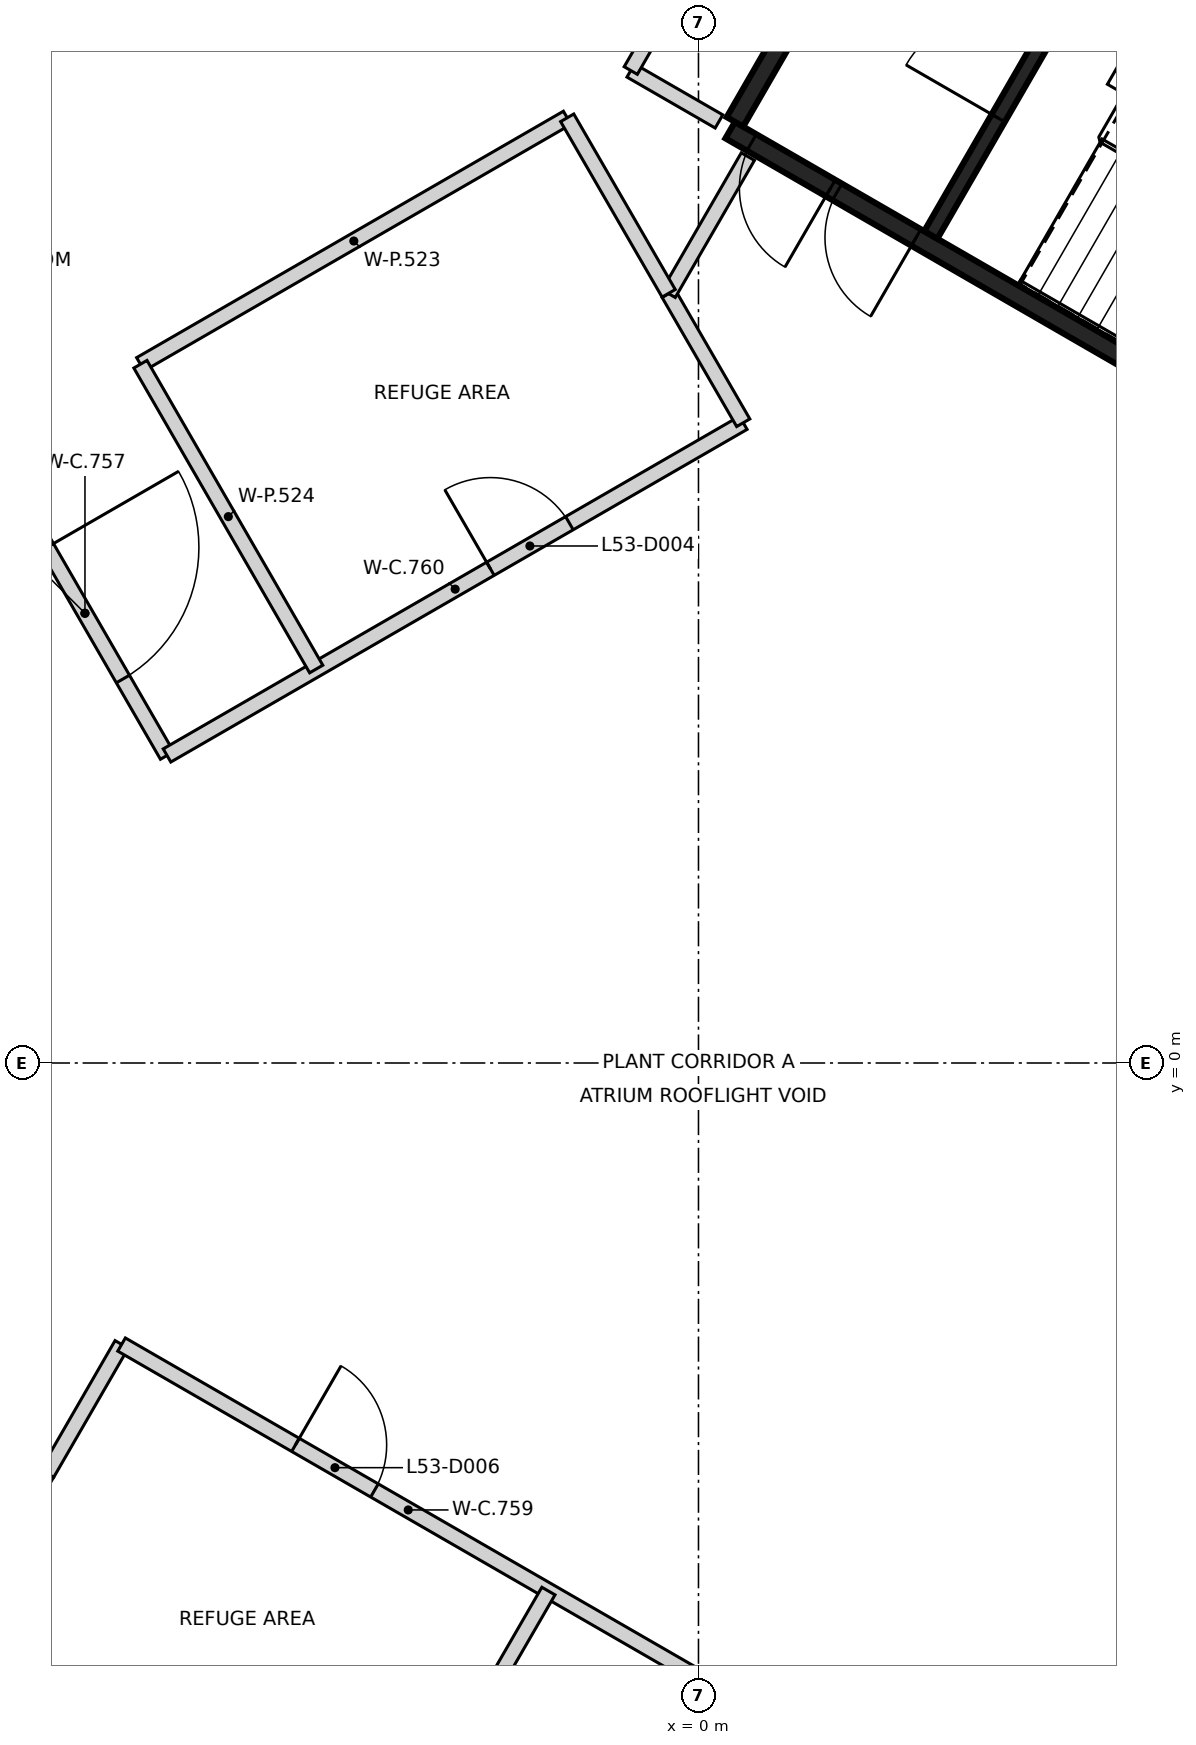
"""IFC4 building model, lengths in metres.
Left out: names, types, materials, properties, quantities, classifications, styles, units other than length and angle.
Written with IfcOpenShell. Run it as: python <this file> out.ifc"""

import sys

from ifc_helpers import new_model, si_unit, direction, frame, frame_2d, origin, origin_2d, place, context, subcontext, project, spatial, rectangle, extrude, element, fill, save


model = new_model("IFC4")
c1 = context("Model", 3, precision=1e-05, world=origin(), true_north=direction((0.0, 1.0)))
c2 = subcontext(c1, "Body", "Model", "MODEL_VIEW")
j1 = project(units=[si_unit("LENGTHUNIT", "METRE"), si_unit("PLANEANGLEUNIT", "RADIAN")], contexts=[c1])
p1 = place(None, origin())
s1 = spatial("IfcSite", under=j1, at=p1, CompositionType="ELEMENT")
p2 = place(p1, origin())
s2 = spatial("IfcBuilding", under=s1, at=p2, CompositionType="ELEMENT")
p3 = place(p2, frame((0.0, 0.0, 211.6)))
s3 = spatial("IfcBuildingStorey", under=s2, at=p3, CompositionType="ELEMENT", Elevation=211.6)
p4 = place(p3, frame((10.42, 6.498, 0.0), z_axis=(0.0, 0.0, 1.0), x_axis=(-0.866021906294, 0.500006057782, 0.0)))
e1 = element("IfcWall", 1, at=p4, inside=s3, PredefinedType="SHEAR", context=c2, shape_type="SweptSolid", body=[
    extrude(rectangle(XDim=11.55, YDim=0.25, at=frame_2d((5.775, 0.0))), origin(), (0.0, 0.0, 1.0), 4.45),
])
p5 = place(p4, frame((10.025, 0.0, 0.0)))
e2 = element("IfcOpeningElement", 2, at=p5, cuts=e1, PredefinedType="OPENING", context=c2, shape_type="SweptSolid", body=[
    extrude(rectangle(XDim=1.2, YDim=2.1, at=frame_2d((0.6, 1.05))), frame((0.0, 0.135, 0.0), z_axis=(0.0, -1.0, 0.0), x_axis=(1.0, 0.0, 0.0)), (0.0, 0.0, 1.0), 0.27),
])
p6 = place(p4, frame((8.725, 0.0, 0.0)))
e3 = element("IfcOpeningElement", 3, at=p6, cuts=e1, PredefinedType="OPENING", context=c2, shape_type="SweptSolid", body=[
    extrude(rectangle(XDim=1.2, YDim=2.1, at=frame_2d((0.6, 1.05))), frame((0.0, 0.135, 0.0), z_axis=(0.0, -1.0, 0.0), x_axis=(1.0, 0.0, 0.0)), (0.0, 0.0, 1.0), 0.27),
])
p7 = place(p3, frame((0.48, 12.381, 0.0), z_axis=(0.0, 0.0, 1.0), x_axis=(0.49999885962, 0.866026062182, 0.0)))
e4 = element("IfcWall", 4, at=p7, inside=s3, PredefinedType="SHEAR", context=c2, shape_type="SweptSolid", body=[
    extrude(rectangle(XDim=5.225, YDim=0.25, at=frame_2d((2.612, 0.0))), origin(), (0.0, 0.0, 1.0), 4.45),
])
p8 = place(p7, frame((1.95, 0.0, 0.0)))
e5 = element("IfcOpeningElement", 5, at=p8, cuts=e4, PredefinedType="OPENING", context=c2, shape_type="SweptSolid", body=[
    extrude(rectangle(XDim=1.2, YDim=2.1, at=frame_2d((0.6, 1.05))), frame((0.0, 0.135, 0.0), z_axis=(0.0, -1.0, 0.0), x_axis=(1.0, 0.0, 0.0)), (0.0, 0.0, 1.0), 0.27),
])
p9 = place(p3, frame((3.057, 10.895, 0.0), z_axis=(0.0, 0.0, 1.0), x_axis=(0.500027839223, 0.866009330205, 0.0)))
e6 = element("IfcWall", 6, at=p9, inside=s3, PredefinedType="SHEAR", context=c2, shape_type="SweptSolid", body=[
    extrude(rectangle(XDim=5.098, YDim=0.2, at=frame_2d((2.549, 0.0))), origin(), (0.0, 0.0, 1.0), 4.45),
])
p10 = place(p9, frame((1.774, 0.0, 0.0)))
e7 = element("IfcOpeningElement", 7, at=p10, cuts=e6, PredefinedType="OPENING", context=c2, shape_type="SweptSolid", body=[
    extrude(rectangle(XDim=1.4, YDim=2.1, at=frame_2d((0.7, 1.05))), frame((0.0, 0.11, 0.0), z_axis=(0.0, -1.0, 0.0), x_axis=(1.0, 0.0, 0.0)), (0.0, 0.0, 1.0), 0.22),
])
p11 = place(p3, frame((0.417, -12.273, 0.0), z_axis=(0.0, 0.0, 1.0), x_axis=(0.866021906294, 0.500006057782, 0.0)))
e8 = element("IfcWall", 8, at=p11, inside=s3, PredefinedType="SHEAR", context=c2, shape_type="SweptSolid", body=[
    extrude(rectangle(XDim=11.55, YDim=0.25, at=frame_2d((5.775, 0.0))), origin(), (0.0, 0.0, 1.0), 4.45),
])
p12 = place(p11, frame((10.025, 0.0, 0.0)))
e9 = element("IfcOpeningElement", 9, at=p12, cuts=e8, PredefinedType="OPENING", context=c2, shape_type="SweptSolid", body=[
    extrude(rectangle(XDim=1.2, YDim=2.1, at=frame_2d((0.6, 1.05))), frame((0.0, 0.135, 0.0), z_axis=(0.0, -1.0, 0.0), x_axis=(1.0, 0.0, 0.0)), (0.0, 0.0, 1.0), 0.27),
])
p13 = place(p11, frame((8.725, 0.0, 0.0)))
e10 = element("IfcOpeningElement", 10, at=p13, cuts=e8, PredefinedType="OPENING", context=c2, shape_type="SweptSolid", body=[
    extrude(rectangle(XDim=1.2, YDim=2.1, at=frame_2d((0.6, 1.05))), frame((0.0, 0.135, 0.0), z_axis=(0.0, -1.0, 0.0), x_axis=(1.0, 0.0, 0.0)), (0.0, 0.0, 1.0), 0.27),
])
p14 = place(p3, frame((-9.151, 7.786, 0.0), z_axis=(0.0, 0.0, 1.0), x_axis=(0.499939416935, -0.866060378608, 0.0)))
e11 = element("IfcWall", 11, at=p14, inside=s3, PredefinedType="PARTITIONING", context=c2, shape_type="SweptSolid", body=[
    extrude(rectangle(XDim=4.318, YDim=0.2, at=frame_2d((2.159, 0.0))), origin(), (0.0, 0.0, 1.0), 4.45),
])
p15 = place(p14, frame((1.157, 0.0, 0.0)))
e12 = element("IfcOpeningElement", 12, at=p15, cuts=e11, PredefinedType="OPENING", context=c2, shape_type="SweptSolid", body=[
    extrude(rectangle(XDim=2.0, YDim=2.1, at=frame_2d((1.0, 1.05))), frame((0.0, 0.11, 0.0), z_axis=(0.0, -1.0, 0.0), x_axis=(1.0, 0.0, 0.0)), (0.0, 0.0, 1.0), 0.22),
])
p16 = place(p3, frame((-8.569, -5.4, 0.0), z_axis=(0.0, 0.0, 1.0), x_axis=(0.499862594797, 0.866104720183, 0.0)))
e13 = element("IfcWall", 13, at=p16, inside=s3, PredefinedType="PARTITIONING", context=c2, shape_type="SweptSolid", body=[
    extrude(rectangle(XDim=1.96, YDim=0.2, at=frame_2d((0.98, 0.0))), origin(), (0.0, 0.0, 1.0), 4.45),
])
p17 = place(p3, frame((-7.59, -3.704, 0.0), z_axis=(0.0, 0.0, 1.0), x_axis=(0.866168783239, -0.499751577228, 0.0)))
e14 = element("IfcWall", 14, at=p17, inside=s3, PredefinedType="PARTITIONING", context=c2, shape_type="SweptSolid", body=[
    extrude(rectangle(XDim=8.708, YDim=0.2, at=frame_2d((4.354, 0.0))), origin(), (0.0, 0.0, 1.0), 4.45),
])
p18 = place(p17, frame((2.641, 0.0, 0.0)))
e15 = element("IfcOpeningElement", 15, at=p18, cuts=e14, PredefinedType="OPENING", context=c2, shape_type="SweptSolid", body=[
    extrude(rectangle(XDim=1.2, YDim=2.1, at=frame_2d((0.6, 1.05))), frame((0.0, 0.11, 0.0), z_axis=(0.0, -1.0, 0.0), x_axis=(1.0, 0.0, 0.0)), (0.0, 0.0, 1.0), 0.22),
])
p19 = place(p3, frame((-6.992, 4.046, 0.0), z_axis=(0.0, 0.0, 1.0), x_axis=(0.866074131153, 0.499915592224, 0.0)))
e16 = element("IfcWall", 16, at=p19, inside=s3, PredefinedType="PARTITIONING", context=c2, shape_type="SweptSolid", body=[
    extrude(rectangle(XDim=8.754, YDim=0.2, at=frame_2d((4.377, 0.0))), origin(), (0.0, 0.0, 1.0), 4.45),
])
p20 = place(p19, frame((4.913, 0.0, 0.0)))
e17 = element("IfcOpeningElement", 17, at=p20, cuts=e16, PredefinedType="OPENING", context=c2, shape_type="SweptSolid", body=[
    extrude(rectangle(XDim=1.2, YDim=2.1, at=frame_2d((0.6, 1.05))), frame((0.0, 0.11, 0.0), z_axis=(0.0, -1.0, 0.0), x_axis=(1.0, 0.0, 0.0)), (0.0, 0.0, 1.0), 0.22),
])
p21 = place(p3, frame((-0.891, 13.057, 0.0), z_axis=(0.0, 0.0, 1.0), x_axis=(0.866206814563, -0.499685655593, 0.0)))
e18 = element("IfcWall", 18, at=p21, inside=s3, PredefinedType="PARTITIONING", context=c2, shape_type="SweptSolid", body=[
    extrude(rectangle(XDim=1.34, YDim=0.2, at=frame_2d((0.67, 0.0))), origin(), (0.0, 0.0, 1.0), 4.45),
])
p22 = place(p3, frame((-0.891, 13.057, 0.0), z_axis=(0.0, 0.0, 1.0), x_axis=(0.499972238474, 0.866041431316, 0.0)))
e19 = element("IfcWall", 19, at=p22, inside=s3, PredefinedType="PARTITIONING", context=c2, shape_type="SweptSolid", body=[
    extrude(rectangle(XDim=7.953, YDim=0.2, at=frame_2d((3.977, 0.0))), origin(), (0.0, 0.0, 1.0), 4.45),
])
p23 = place(p3, frame((-0.392, 10.121, 0.0), z_axis=(0.0, 0.0, 1.0), x_axis=(0.500329449036, -0.865835112725, 0.0)))
e20 = element("IfcWall", 20, at=p23, inside=s3, PredefinedType="PARTITIONING", context=c2, shape_type="SweptSolid", body=[
    extrude(rectangle(XDim=1.961, YDim=0.2, at=frame_2d((0.98, 0.0))), origin(), (0.0, 0.0, 1.0), 4.45),
])
p24 = place(p3, frame((-0.392, 10.121, 0.0), z_axis=(0.0, 0.0, 1.0), x_axis=(0.50017216111, 0.865925983702, 0.0)))
e21 = element("IfcWall", 21, at=p24, inside=s3, PredefinedType="PARTITIONING", context=c2, shape_type="SweptSolid", body=[
    extrude(rectangle(XDim=2.083, YDim=0.2, at=frame_2d((1.042, 0.0))), origin(), (0.0, 0.0, 1.0), 4.45),
])
p25 = place(p3, frame((-9.905, -7.714, 0.0), z_axis=(0.0, 0.0, 1.0), x_axis=(0.499368495827, 0.866389696023, 0.0)))
e22 = element("IfcWall", 22, at=p25, inside=s3, PredefinedType="PARTITIONING", context=c2, shape_type="SweptSolid", body=[
    extrude(rectangle(XDim=2.667, YDim=0.2, at=frame_2d((1.334, 0.0))), origin(), (0.0, 0.0, 1.0), 4.45),
])
p26 = place(p3, frame((-9.905, -7.714, 0.0), z_axis=(0.0, 0.0, 1.0), x_axis=(0.866044474677, -0.49996696679, 0.0)))
e23 = element("IfcWall", 23, at=p26, inside=s3, PredefinedType="PARTITIONING", context=c2, shape_type="SweptSolid", body=[
    extrude(rectangle(XDim=6.482, YDim=0.2, at=frame_2d((3.241, 0.0))), origin(), (0.0, 0.0, 1.0), 4.45),
])
p27 = place(p3, frame((-7.342, 9.193, 0.0), z_axis=(0.0, 0.0, 1.0), x_axis=(0.866016906217, 0.500014717929, 0.0)))
e24 = element("IfcWall", 24, at=p27, inside=s3, PredefinedType="PARTITIONING", context=c2, shape_type="SweptSolid", body=[
    extrude(rectangle(XDim=6.484, YDim=0.2, at=frame_2d((3.242, 0.0))), origin(), (0.0, 0.0, 1.0), 4.45),
])
p28 = place(p3, frame((-7.342, 9.193, 0.0), z_axis=(0.0, 0.0, 1.0), x_axis=(0.499644836288, -0.866230360569, 0.0)))
e25 = element("IfcWall", 25, at=p28, inside=s3, PredefinedType="PARTITIONING", context=c2, shape_type="SweptSolid", body=[
    extrude(rectangle(XDim=4.629, YDim=0.2, at=frame_2d((2.314, 0.0))), origin(), (0.0, 0.0, 1.0), 4.45),
])
p29 = place(p3, frame((-4.291, -10.955, 0.0), z_axis=(0.0, 0.0, 1.0), x_axis=(0.500460335608, 0.86575946572, 0.0)))
e26 = element("IfcWall", 26, at=p29, inside=s3, PredefinedType="PARTITIONING", context=c2, shape_type="SweptSolid", body=[
    extrude(rectangle(XDim=4.63, YDim=0.2, at=frame_2d((2.315, 0.0))), origin(), (0.0, 0.0, 1.0), 4.45),
])
p30 = place(p3, frame((-1.727, 12.435, 0.0), z_axis=(0.0, 0.0, 1.0), x_axis=(0.500509380909, -0.865731112772, 0.0)))
e27 = element("IfcWall", 27, at=p30, inside=s3, PredefinedType="PARTITIONING", context=c2, shape_type="SweptSolid", body=[
    extrude(rectangle(XDim=2.667, YDim=0.2, at=frame_2d((1.333, 0.0))), origin(), (0.0, 0.0, 1.0), 4.45),
])
p31 = place(p3, frame((0.0, 0.0, -0.4)))
p32 = place(p31, origin())
p33 = place(p32, frame((0.0, 0.0, 0.35)))
e28 = element("IfcWindow", 28, at=p33, inside=s3, PartitioningType="SINGLE_PANEL", PredefinedType="SKYLIGHT", context=c2, shape_type="SweptSolid", body=[
    extrude(rectangle(XDim=7.95, YDim=4.96, at=origin_2d()), origin(), (0.0, 0.0, 1.0), 0.05),
])
p34 = place(p5, origin())
e29 = element("IfcDoor", 29, at=p34, inside=s3, OperationType="SINGLE_SWING_LEFT", PredefinedType="DOOR", context=c2, shape_type="SweptSolid", body=[
    extrude(rectangle(XDim=1.2, YDim=2.1, at=frame_2d((0.6, 1.05))), frame((0.0, 0.025, 0.0), z_axis=(0.0, -1.0, 0.0), x_axis=(1.0, 0.0, 0.0)), (0.0, 0.0, 1.0), 0.05),
])
fill(e2, e29)
p35 = place(p6, origin())
e30 = element("IfcDoor", 30, at=p35, inside=s3, OperationType="SINGLE_SWING_RIGHT", PredefinedType="DOOR", context=c2, shape_type="SweptSolid", body=[
    extrude(rectangle(XDim=1.2, YDim=2.1, at=frame_2d((0.6, 1.05))), frame((0.0, 0.025, 0.0), z_axis=(0.0, -1.0, 0.0), x_axis=(1.0, 0.0, 0.0)), (0.0, 0.0, 1.0), 0.05),
])
fill(e3, e30)
p36 = place(p10, origin())
e31 = element("IfcDoor", 31, at=p36, inside=s3, OperationType="SINGLE_SWING_LEFT", PredefinedType="DOOR", context=c2, shape_type="SweptSolid", body=[
    extrude(rectangle(XDim=1.4, YDim=2.1, at=frame_2d((0.7, 1.05))), frame((0.0, 0.025, 0.0), z_axis=(0.0, -1.0, 0.0), x_axis=(1.0, 0.0, 0.0)), (0.0, 0.0, 1.0), 0.05),
])
fill(e7, e31)
p37 = place(p15, origin())
e32 = element("IfcDoor", 32, at=p37, inside=s3, OperationType="DOUBLE_DOOR_SINGLE_SWING", PredefinedType="DOOR", context=c2, shape_type="SweptSolid", body=[
    extrude(rectangle(XDim=2.0, YDim=2.1, at=frame_2d((1.0, 1.05))), frame((0.0, 0.025, 0.0), z_axis=(0.0, -1.0, 0.0), x_axis=(1.0, 0.0, 0.0)), (0.0, 0.0, 1.0), 0.05),
])
fill(e12, e32)
p38 = place(p20, origin())
e33 = element("IfcDoor", 33, at=p38, inside=s3, OperationType="SINGLE_SWING_LEFT", PredefinedType="DOOR", context=c2, shape_type="SweptSolid", body=[
    extrude(rectangle(XDim=1.2, YDim=2.1, at=frame_2d((0.6, 1.05))), frame((0.0, 0.025, 0.0), z_axis=(0.0, -1.0, 0.0), x_axis=(1.0, 0.0, 0.0)), (0.0, 0.0, 1.0), 0.05),
])
fill(e17, e33)
p39 = place(p18, frame((1.2, 0.0, 0.0), z_axis=(0.0, 0.0, 1.0), x_axis=(-1.0, 0.0, 0.0)))
e34 = element("IfcDoor", 34, at=p39, inside=s3, OperationType="SINGLE_SWING_LEFT", PredefinedType="DOOR", context=c2, shape_type="SweptSolid", body=[
    extrude(rectangle(XDim=1.2, YDim=2.1, at=frame_2d((0.6, 1.05))), frame((0.0, 0.025, 0.0), z_axis=(0.0, -1.0, 0.0), x_axis=(1.0, 0.0, 0.0)), (0.0, 0.0, 1.0), 0.05),
])
fill(e15, e34)
save(model, sys.argv[1])
